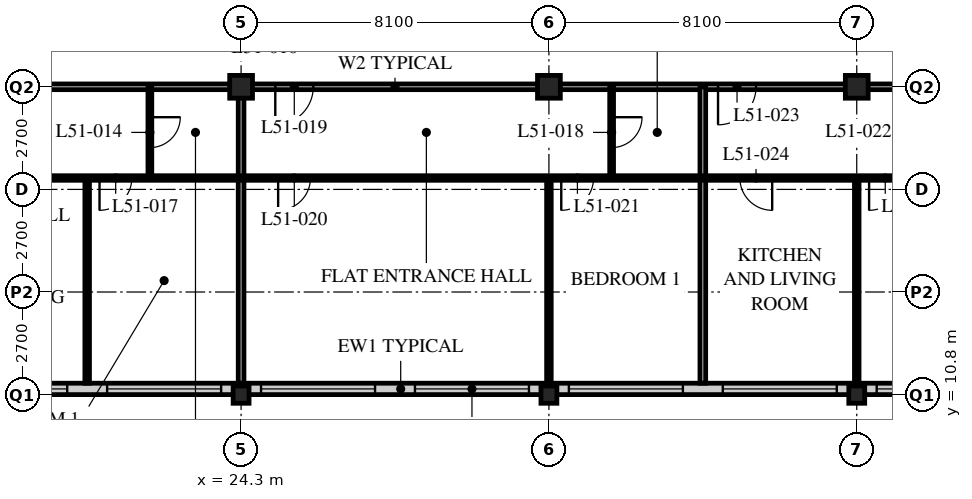
"""IFC4 building model, lengths in metres.
Left out: names, types, materials, properties, quantities, classifications, styles, units other than length and angle.
Written with IfcOpenShell. Run it as: python <this file> out.ifc"""

import sys

from ifc_helpers import new_model, si_unit, direction, frame, frame_2d, origin, origin_2d, place, context, subcontext, project, spatial, rectangle, hollow_rectangle, i_section, extrude, element, fill, save


model = new_model("IFC4")
c1 = context("Model", 3, precision=1e-05, world=origin(), true_north=direction((0.0, 1.0)))
c2 = subcontext(c1, "Body", "Model", "MODEL_VIEW")
j1 = project(units=[si_unit("LENGTHUNIT", "METRE"), si_unit("PLANEANGLEUNIT", "RADIAN")], contexts=[c1])
p1 = place(None, origin())
s1 = spatial("IfcSite", under=j1, at=p1, CompositionType="ELEMENT")
p2 = place(p1, origin())
s2 = spatial("IfcBuilding", under=s1, at=p2, CompositionType="ELEMENT")
p3 = place(p2, frame((0.0, 0.0, 199.2)))
s3 = spatial("IfcBuildingStorey", under=s2, at=p3, CompositionType="ELEMENT", Elevation=199.2)
p4 = place(p3, frame((24.3, 10.8, 0.0), z_axis=(0.0, 0.0, 1.0), x_axis=(1.0, 0.0, 0.0)))
e1 = element("IfcColumn", 1, at=p4, inside=s3, PredefinedType="COLUMN", context=c2, shape_type="SweptSolid", body=[
    extrude(i_section(OverallWidth=0.418, OverallDepth=0.456, WebThickness=0.042, FlangeThickness=0.067, FilletRadius=0.015, at=origin_2d()), origin(), (0.0, 0.0, 1.0), 3.6),
])
p5 = place(p3, frame((24.3, 18.9, 0.0), z_axis=(0.0, 0.0, 1.0), x_axis=(1.0, 0.0, 0.0)))
e2 = element("IfcColumn", 2, at=p5, inside=s3, PredefinedType="COLUMN", context=c2, shape_type="SweptSolid", body=[
    extrude(hollow_rectangle(XDim=0.6, YDim=0.6, WallThickness=0.05, at=origin_2d()), origin(), (0.0, 0.0, 1.0), 3.6),
])
p6 = place(p3, frame((32.4, 10.8, 0.0), z_axis=(0.0, 0.0, 1.0), x_axis=(1.0, 0.0, 0.0)))
e3 = element("IfcColumn", 3, at=p6, inside=s3, PredefinedType="COLUMN", context=c2, shape_type="SweptSolid", body=[
    extrude(i_section(OverallWidth=0.418, OverallDepth=0.456, WebThickness=0.042, FlangeThickness=0.067, FilletRadius=0.015, at=origin_2d()), origin(), (0.0, 0.0, 1.0), 3.6),
])
p7 = place(p3, frame((32.4, 18.9, 0.0), z_axis=(0.0, 0.0, 1.0), x_axis=(1.0, 0.0, 0.0)))
e4 = element("IfcColumn", 4, at=p7, inside=s3, PredefinedType="COLUMN", context=c2, shape_type="SweptSolid", body=[
    extrude(hollow_rectangle(XDim=0.6, YDim=0.6, WallThickness=0.05, at=origin_2d()), origin(), (0.0, 0.0, 1.0), 3.6),
])
p8 = place(p3, frame((40.5, 10.8, 0.0), z_axis=(0.0, 0.0, 1.0), x_axis=(1.0, 0.0, 0.0)))
e5 = element("IfcColumn", 5, at=p8, inside=s3, PredefinedType="COLUMN", context=c2, shape_type="SweptSolid", body=[
    extrude(i_section(OverallWidth=0.418, OverallDepth=0.456, WebThickness=0.042, FlangeThickness=0.067, FilletRadius=0.015, at=origin_2d()), origin(), (0.0, 0.0, 1.0), 3.6),
])
p9 = place(p3, frame((40.5, 18.9, 0.0), z_axis=(0.0, 0.0, 1.0), x_axis=(1.0, 0.0, 0.0)))
e6 = element("IfcColumn", 6, at=p9, inside=s3, PredefinedType="COLUMN", context=c2, shape_type="SweptSolid", body=[
    extrude(hollow_rectangle(XDim=0.6, YDim=0.6, WallThickness=0.05, at=origin_2d()), origin(), (0.0, 0.0, 1.0), 3.6),
])
p10 = place(p3, frame((8.4, 10.95, 0.0), z_axis=(0.0, 0.0, 1.0), x_axis=(1.0, 0.0, 0.0)))
e7 = element("IfcWall", 7, at=p10, inside=s3, PredefinedType="SOLIDWALL", context=c2, shape_type="SweptSolid", body=[
    extrude(rectangle(XDim=40.2, YDim=0.3, at=frame_2d((20.1, 0.0))), origin(), (0.0, 0.0, 1.0), 3.39),
])
p11 = place(p10, frame((0.225, 0.0, 0.6)))
e8 = element("IfcOpeningElement", 8, at=p11, cuts=e7, PredefinedType="OPENING", context=c2, shape_type="SweptSolid", body=[
    extrude(rectangle(XDim=3.0, YDim=2.4, at=frame_2d((1.5, 1.2))), frame((0.0, 0.16, 0.0), z_axis=(0.0, -1.0, 0.0), x_axis=(1.0, 0.0, 0.0)), (0.0, 0.0, 1.0), 0.32),
])
p12 = place(p10, frame((4.275, 0.0, 0.6)))
e9 = element("IfcOpeningElement", 9, at=p12, cuts=e7, PredefinedType="OPENING", context=c2, shape_type="SweptSolid", body=[
    extrude(rectangle(XDim=3.0, YDim=2.4, at=frame_2d((1.5, 1.2))), frame((0.0, 0.16, 0.0), z_axis=(0.0, -1.0, 0.0), x_axis=(1.0, 0.0, 0.0)), (0.0, 0.0, 1.0), 0.32),
])
p13 = place(p10, frame((8.325, 0.0, 0.6)))
e10 = element("IfcOpeningElement", 10, at=p13, cuts=e7, PredefinedType="OPENING", context=c2, shape_type="SweptSolid", body=[
    extrude(rectangle(XDim=3.0, YDim=2.4, at=frame_2d((1.5, 1.2))), frame((0.0, 0.16, 0.0), z_axis=(0.0, -1.0, 0.0), x_axis=(1.0, 0.0, 0.0)), (0.0, 0.0, 1.0), 0.32),
])
p14 = place(p10, frame((12.375, 0.0, 0.6)))
e11 = element("IfcOpeningElement", 11, at=p14, cuts=e7, PredefinedType="OPENING", context=c2, shape_type="SweptSolid", body=[
    extrude(rectangle(XDim=3.0, YDim=2.4, at=frame_2d((1.5, 1.2))), frame((0.0, 0.16, 0.0), z_axis=(0.0, -1.0, 0.0), x_axis=(1.0, 0.0, 0.0)), (0.0, 0.0, 1.0), 0.32),
])
p15 = place(p10, frame((16.425, 0.0, 0.6)))
e12 = element("IfcOpeningElement", 12, at=p15, cuts=e7, PredefinedType="OPENING", context=c2, shape_type="SweptSolid", body=[
    extrude(rectangle(XDim=3.0, YDim=2.4, at=frame_2d((1.5, 1.2))), frame((0.0, 0.16, 0.0), z_axis=(0.0, -1.0, 0.0), x_axis=(1.0, 0.0, 0.0)), (0.0, 0.0, 1.0), 0.32),
])
p16 = place(p10, frame((20.475, 0.0, 0.6)))
e13 = element("IfcOpeningElement", 13, at=p16, cuts=e7, PredefinedType="OPENING", context=c2, shape_type="SweptSolid", body=[
    extrude(rectangle(XDim=3.0, YDim=2.4, at=frame_2d((1.5, 1.2))), frame((0.0, 0.16, 0.0), z_axis=(0.0, -1.0, 0.0), x_axis=(1.0, 0.0, 0.0)), (0.0, 0.0, 1.0), 0.32),
])
p17 = place(p10, frame((24.525, 0.0, 0.6)))
e14 = element("IfcOpeningElement", 14, at=p17, cuts=e7, PredefinedType="OPENING", context=c2, shape_type="SweptSolid", body=[
    extrude(rectangle(XDim=3.0, YDim=2.4, at=frame_2d((1.5, 1.2))), frame((0.0, 0.16, 0.0), z_axis=(0.0, -1.0, 0.0), x_axis=(1.0, 0.0, 0.0)), (0.0, 0.0, 1.0), 0.32),
])
p18 = place(p10, frame((28.575, 0.0, 0.6)))
e15 = element("IfcOpeningElement", 15, at=p18, cuts=e7, PredefinedType="OPENING", context=c2, shape_type="SweptSolid", body=[
    extrude(rectangle(XDim=3.0, YDim=2.4, at=frame_2d((1.5, 1.2))), frame((0.0, 0.16, 0.0), z_axis=(0.0, -1.0, 0.0), x_axis=(1.0, 0.0, 0.0)), (0.0, 0.0, 1.0), 0.32),
])
p19 = place(p10, frame((32.625, 0.0, 0.6)))
e16 = element("IfcOpeningElement", 16, at=p19, cuts=e7, PredefinedType="OPENING", context=c2, shape_type="SweptSolid", body=[
    extrude(rectangle(XDim=3.0, YDim=2.4, at=frame_2d((1.5, 1.2))), frame((0.0, 0.16, 0.0), z_axis=(0.0, -1.0, 0.0), x_axis=(1.0, 0.0, 0.0)), (0.0, 0.0, 1.0), 0.32),
])
p20 = place(p10, frame((36.675, 0.0, 0.6)))
e17 = element("IfcOpeningElement", 17, at=p20, cuts=e7, PredefinedType="OPENING", context=c2, shape_type="SweptSolid", body=[
    extrude(rectangle(XDim=3.0, YDim=2.4, at=frame_2d((1.5, 1.2))), frame((0.0, 0.16, 0.0), z_axis=(0.0, -1.0, 0.0), x_axis=(1.0, 0.0, 0.0)), (0.0, 0.0, 1.0), 0.32),
])
p21 = place(p3, frame((8.1, 18.9, 0.0), z_axis=(0.0, 0.0, 1.0), x_axis=(1.0, 0.0, 0.0)))
e18 = element("IfcWall", 18, at=p21, inside=s3, PredefinedType="PARTITIONING", context=c2, shape_type="SweptSolid", body=[
    extrude(rectangle(XDim=40.5, YDim=0.15, at=frame_2d((20.25, 0.0))), origin(), (0.0, 0.0, 1.0), 2.778),
])
p22 = place(p21, frame((4.45, 0.0, 0.0)))
e19 = element("IfcOpeningElement", 19, at=p22, cuts=e18, PredefinedType="OPENING", context=c2, shape_type="SweptSolid", body=[
    extrude(rectangle(XDim=1.0, YDim=2.1, at=frame_2d((0.5, 1.05))), frame((0.0, 0.085, 0.0), z_axis=(0.0, -1.0, 0.0), x_axis=(1.0, 0.0, 0.0)), (0.0, 0.0, 1.0), 0.17),
])
p23 = place(p21, frame((17.1, 0.0, 0.0)))
e20 = element("IfcOpeningElement", 20, at=p23, cuts=e18, PredefinedType="OPENING", context=c2, shape_type="SweptSolid", body=[
    extrude(rectangle(XDim=1.0, YDim=2.1, at=frame_2d((0.5, 1.05))), frame((0.0, 0.085, 0.0), z_axis=(0.0, -1.0, 0.0), x_axis=(1.0, 0.0, 0.0)), (0.0, 0.0, 1.0), 0.17),
])
p24 = place(p21, frame((28.75, 0.0, 0.0)))
e21 = element("IfcOpeningElement", 21, at=p24, cuts=e18, PredefinedType="OPENING", context=c2, shape_type="SweptSolid", body=[
    extrude(rectangle(XDim=1.0, YDim=2.1, at=frame_2d((0.5, 1.05))), frame((0.0, 0.085, 0.0), z_axis=(0.0, -1.0, 0.0), x_axis=(1.0, 0.0, 0.0)), (0.0, 0.0, 1.0), 0.17),
])
p25 = place(p21, frame((2.625, 0.0, 0.0)))
e22 = element("IfcOpeningElement", 22, at=p25, cuts=e18, PredefinedType="OPENING", context=c2, shape_type="SweptSolid", body=[
    extrude(rectangle(XDim=1.0, YDim=2.1, at=frame_2d((0.5, 1.05))), frame((0.0, 0.085, 0.0), z_axis=(0.0, -1.0, 0.0), x_axis=(1.0, 0.0, 0.0)), (0.0, 0.0, 1.0), 0.17),
])
p26 = place(p21, frame((36.875, 0.0, 0.0)))
e23 = element("IfcOpeningElement", 23, at=p26, cuts=e18, PredefinedType="OPENING", context=c2, shape_type="SweptSolid", body=[
    extrude(rectangle(XDim=1.0, YDim=2.1, at=frame_2d((0.5, 1.05))), frame((0.0, 0.085, 0.0), z_axis=(0.0, -1.0, 0.0), x_axis=(1.0, 0.0, 0.0)), (0.0, 0.0, 1.0), 0.17),
])
p27 = place(p3, frame((21.9, 18.9, 0.0), z_axis=(0.0, 0.0, 1.0), x_axis=(0.0, -1.0, 0.0)))
e24 = element("IfcWall", 24, at=p27, inside=s3, PredefinedType="PARTITIONING", context=c2, shape_type="SweptSolid", body=[
    extrude(rectangle(XDim=2.4, YDim=0.1, at=frame_2d((1.2, 0.0))), origin(), (0.0, 0.0, 1.0), 3.39),
])
p28 = place(p27, frame((0.8, 0.0, 0.0)))
e25 = element("IfcOpeningElement", 25, at=p28, cuts=e24, PredefinedType="OPENING", context=c2, shape_type="SweptSolid", body=[
    extrude(rectangle(XDim=0.8, YDim=2.1, at=frame_2d((0.4, 1.05))), frame((0.0, 0.06, 0.0), z_axis=(0.0, -1.0, 0.0), x_axis=(1.0, 0.0, 0.0)), (0.0, 0.0, 1.0), 0.12),
])
p29 = place(p3, frame((20.25, 16.5, 0.0), z_axis=(0.0, 0.0, 1.0), x_axis=(0.0, -1.0, 0.0)))
e26 = element("IfcWall", 26, at=p29, inside=s3, PredefinedType="PARTITIONING", context=c2, shape_type="SweptSolid", body=[
    extrude(rectangle(XDim=5.4, YDim=0.12, at=frame_2d((2.7, 0.0))), origin(), (0.0, 0.0, 1.0), 3.39),
])
p30 = place(p3, frame((24.3, 18.9, 0.0), z_axis=(0.0, 0.0, 1.0), x_axis=(0.0, -1.0, 0.0)))
e27 = element("IfcWall", 27, at=p30, inside=s3, PredefinedType="PARTITIONING", context=c2, shape_type="SweptSolid", body=[
    extrude(rectangle(XDim=7.8, YDim=0.15, at=frame_2d((3.9, 0.0))), origin(), (0.0, 0.0, 1.0), 2.778),
])
p31 = place(p3, frame((34.05, 18.9, 0.0), z_axis=(0.0, 0.0, 1.0), x_axis=(0.0, -1.0, 0.0)))
e28 = element("IfcWall", 28, at=p31, inside=s3, PredefinedType="PARTITIONING", context=c2, shape_type="SweptSolid", body=[
    extrude(rectangle(XDim=2.4, YDim=0.1, at=frame_2d((1.2, 0.0))), origin(), (0.0, 0.0, 1.0), 3.39),
])
p32 = place(p31, frame((0.8, 0.0, 0.0)))
e29 = element("IfcOpeningElement", 29, at=p32, cuts=e28, PredefinedType="OPENING", context=c2, shape_type="SweptSolid", body=[
    extrude(rectangle(XDim=0.8, YDim=2.1, at=frame_2d((0.4, 1.05))), frame((0.0, 0.06, 0.0), z_axis=(0.0, -1.0, 0.0), x_axis=(1.0, 0.0, 0.0)), (0.0, 0.0, 1.0), 0.12),
])
p33 = place(p3, frame((32.4, 16.5, 0.0), z_axis=(0.0, 0.0, 1.0), x_axis=(0.0, -1.0, 0.0)))
e30 = element("IfcWall", 30, at=p33, inside=s3, PredefinedType="PARTITIONING", context=c2, shape_type="SweptSolid", body=[
    extrude(rectangle(XDim=5.4, YDim=0.12, at=frame_2d((2.7, 0.0))), origin(), (0.0, 0.0, 1.0), 2.778),
])
p34 = place(p3, frame((36.45, 18.9, 0.0), z_axis=(0.0, 0.0, 1.0), x_axis=(0.0, -1.0, 0.0)))
e31 = element("IfcWall", 31, at=p34, inside=s3, PredefinedType="PARTITIONING", context=c2, shape_type="SweptSolid", body=[
    extrude(rectangle(XDim=7.8, YDim=0.15, at=frame_2d((3.9, 0.0))), origin(), (0.0, 0.0, 1.0), 3.39),
])
p35 = place(p3, frame((40.5, 16.5, 0.0), z_axis=(0.0, 0.0, 1.0), x_axis=(0.0, -1.0, 0.0)))
e32 = element("IfcWall", 32, at=p35, inside=s3, PredefinedType="PARTITIONING", context=c2, shape_type="SweptSolid", body=[
    extrude(rectangle(XDim=5.4, YDim=0.12, at=frame_2d((2.7, 0.0))), origin(), (0.0, 0.0, 1.0), 2.778),
])
p36 = place(p3, frame((8.1, 16.5, 0.0), z_axis=(0.0, 0.0, 1.0), x_axis=(1.0, 0.0, 0.0)))
e33 = element("IfcWall", 33, at=p36, inside=s3, PredefinedType="PARTITIONING", context=c2, shape_type="SweptSolid", body=[
    extrude(rectangle(XDim=40.5, YDim=0.12, at=frame_2d((20.25, 0.0))), origin(), (0.0, 0.0, 1.0), 3.39),
])
p37 = place(p36, frame((5.025, 0.0, 0.0)))
e34 = element("IfcOpeningElement", 34, at=p37, cuts=e33, PredefinedType="OPENING", context=c2, shape_type="SweptSolid", body=[
    extrude(rectangle(XDim=0.85, YDim=2.1, at=frame_2d((0.425, 1.05))), frame((0.0, 0.07, 0.0), z_axis=(0.0, -1.0, 0.0), x_axis=(1.0, 0.0, 0.0)), (0.0, 0.0, 1.0), 0.14),
])
p38 = place(p36, frame((12.475, 0.0, 0.0)))
e35 = element("IfcOpeningElement", 35, at=p38, cuts=e33, PredefinedType="OPENING", context=c2, shape_type="SweptSolid", body=[
    extrude(rectangle(XDim=0.85, YDim=2.1, at=frame_2d((0.425, 1.05))), frame((0.0, 0.07, 0.0), z_axis=(0.0, -1.0, 0.0), x_axis=(1.0, 0.0, 0.0)), (0.0, 0.0, 1.0), 0.14),
])
p39 = place(p36, frame((17.175, 0.0, 0.0)))
e36 = element("IfcOpeningElement", 36, at=p39, cuts=e33, PredefinedType="OPENING", context=c2, shape_type="SweptSolid", body=[
    extrude(rectangle(XDim=0.85, YDim=2.1, at=frame_2d((0.425, 1.05))), frame((0.0, 0.07, 0.0), z_axis=(0.0, -1.0, 0.0), x_axis=(1.0, 0.0, 0.0)), (0.0, 0.0, 1.0), 0.14),
])
p40 = place(p36, frame((24.625, 0.0, 0.0)))
e37 = element("IfcOpeningElement", 37, at=p40, cuts=e33, PredefinedType="OPENING", context=c2, shape_type="SweptSolid", body=[
    extrude(rectangle(XDim=0.85, YDim=2.1, at=frame_2d((0.425, 1.05))), frame((0.0, 0.07, 0.0), z_axis=(0.0, -1.0, 0.0), x_axis=(1.0, 0.0, 0.0)), (0.0, 0.0, 1.0), 0.14),
])
p41 = place(p36, frame((29.325, 0.0, 0.0)))
e38 = element("IfcOpeningElement", 38, at=p41, cuts=e33, PredefinedType="OPENING", context=c2, shape_type="SweptSolid", body=[
    extrude(rectangle(XDim=0.85, YDim=2.1, at=frame_2d((0.425, 1.05))), frame((0.0, 0.07, 0.0), z_axis=(0.0, -1.0, 0.0), x_axis=(1.0, 0.0, 0.0)), (0.0, 0.0, 1.0), 0.14),
])
p42 = place(p36, frame((32.725, 0.0, 0.0)))
e39 = element("IfcOpeningElement", 39, at=p42, cuts=e33, PredefinedType="OPENING", context=c2, shape_type="SweptSolid", body=[
    extrude(rectangle(XDim=0.85, YDim=2.1, at=frame_2d((0.425, 1.05))), frame((0.0, 0.07, 0.0), z_axis=(0.0, -1.0, 0.0), x_axis=(1.0, 0.0, 0.0)), (0.0, 0.0, 1.0), 0.14),
])
p43 = place(p36, frame((2.725, 0.0, 0.0)))
e40 = element("IfcOpeningElement", 40, at=p43, cuts=e33, PredefinedType="OPENING", context=c2, shape_type="SweptSolid", body=[
    extrude(rectangle(XDim=0.85, YDim=2.1, at=frame_2d((0.425, 1.05))), frame((0.0, 0.07, 0.0), z_axis=(0.0, -1.0, 0.0), x_axis=(1.0, 0.0, 0.0)), (0.0, 0.0, 1.0), 0.14),
])
p44 = place(p36, frame((36.925, 0.0, 0.0)))
e41 = element("IfcOpeningElement", 41, at=p44, cuts=e33, PredefinedType="OPENING", context=c2, shape_type="SweptSolid", body=[
    extrude(rectangle(XDim=0.85, YDim=2.1, at=frame_2d((0.425, 1.05))), frame((0.0, 0.07, 0.0), z_axis=(0.0, -1.0, 0.0), x_axis=(1.0, 0.0, 0.0)), (0.0, 0.0, 1.0), 0.14),
])
p45 = place(p13, origin())
e42 = element("IfcWindow", 42, at=p45, inside=s3, PartitioningType="SINGLE_PANEL", PredefinedType="WINDOW", context=c2, shape_type="SweptSolid", body=[
    extrude(rectangle(XDim=3.0, YDim=2.4, at=frame_2d((1.5, 1.2))), frame((0.0, 0.03, 0.0), z_axis=(0.0, -1.0, 0.0), x_axis=(1.0, 0.0, 0.0)), (0.0, 0.0, 1.0), 0.06),
])
fill(e10, e42)
p46 = place(p14, origin())
e43 = element("IfcWindow", 43, at=p46, inside=s3, PartitioningType="SINGLE_PANEL", PredefinedType="WINDOW", context=c2, shape_type="SweptSolid", body=[
    extrude(rectangle(XDim=3.0, YDim=2.4, at=frame_2d((1.5, 1.2))), frame((0.0, 0.03, 0.0), z_axis=(0.0, -1.0, 0.0), x_axis=(1.0, 0.0, 0.0)), (0.0, 0.0, 1.0), 0.06),
])
fill(e11, e43)
p47 = place(p15, origin())
e44 = element("IfcWindow", 44, at=p47, inside=s3, PartitioningType="SINGLE_PANEL", PredefinedType="WINDOW", context=c2, shape_type="SweptSolid", body=[
    extrude(rectangle(XDim=3.0, YDim=2.4, at=frame_2d((1.5, 1.2))), frame((0.0, 0.03, 0.0), z_axis=(0.0, -1.0, 0.0), x_axis=(1.0, 0.0, 0.0)), (0.0, 0.0, 1.0), 0.06),
])
fill(e12, e44)
p48 = place(p16, origin())
e45 = element("IfcWindow", 45, at=p48, inside=s3, PartitioningType="SINGLE_PANEL", PredefinedType="WINDOW", context=c2, shape_type="SweptSolid", body=[
    extrude(rectangle(XDim=3.0, YDim=2.4, at=frame_2d((1.5, 1.2))), frame((0.0, 0.03, 0.0), z_axis=(0.0, -1.0, 0.0), x_axis=(1.0, 0.0, 0.0)), (0.0, 0.0, 1.0), 0.06),
])
fill(e13, e45)
p49 = place(p17, origin())
e46 = element("IfcWindow", 46, at=p49, inside=s3, PartitioningType="SINGLE_PANEL", PredefinedType="WINDOW", context=c2, shape_type="SweptSolid", body=[
    extrude(rectangle(XDim=3.0, YDim=2.4, at=frame_2d((1.5, 1.2))), frame((0.0, 0.03, 0.0), z_axis=(0.0, -1.0, 0.0), x_axis=(1.0, 0.0, 0.0)), (0.0, 0.0, 1.0), 0.06),
])
fill(e14, e46)
p50 = place(p18, origin())
e47 = element("IfcWindow", 47, at=p50, inside=s3, PartitioningType="SINGLE_PANEL", PredefinedType="WINDOW", context=c2, shape_type="SweptSolid", body=[
    extrude(rectangle(XDim=3.0, YDim=2.4, at=frame_2d((1.5, 1.2))), frame((0.0, 0.03, 0.0), z_axis=(0.0, -1.0, 0.0), x_axis=(1.0, 0.0, 0.0)), (0.0, 0.0, 1.0), 0.06),
])
fill(e15, e47)
p51 = place(p19, origin())
e48 = element("IfcWindow", 48, at=p51, inside=s3, PartitioningType="SINGLE_PANEL", PredefinedType="WINDOW", context=c2, shape_type="SweptSolid", body=[
    extrude(rectangle(XDim=3.0, YDim=2.4, at=frame_2d((1.5, 1.2))), frame((0.0, 0.03, 0.0), z_axis=(0.0, -1.0, 0.0), x_axis=(1.0, 0.0, 0.0)), (0.0, 0.0, 1.0), 0.06),
])
fill(e16, e48)
p52 = place(p28, origin())
e49 = element("IfcDoor", 49, at=p52, inside=s3, OperationType="SINGLE_SWING_LEFT", PredefinedType="DOOR", context=c2, shape_type="SweptSolid", body=[
    extrude(rectangle(XDim=0.8, YDim=2.1, at=frame_2d((0.4, 1.05))), frame((0.0, 0.025, 0.0), z_axis=(0.0, -1.0, 0.0), x_axis=(1.0, 0.0, 0.0)), (0.0, 0.0, 1.0), 0.05),
])
fill(e25, e49)
p53 = place(p38, origin())
e50 = element("IfcDoor", 50, at=p53, inside=s3, OperationType="SINGLE_SWING_RIGHT", PredefinedType="DOOR", context=c2, shape_type="SweptSolid", body=[
    extrude(rectangle(XDim=0.85, YDim=2.1, at=frame_2d((0.425, 1.05))), frame((0.0, 0.025, 0.0), z_axis=(0.0, -1.0, 0.0), x_axis=(1.0, 0.0, 0.0)), (0.0, 0.0, 1.0), 0.05),
])
fill(e35, e50)
p54 = place(p32, origin())
e51 = element("IfcDoor", 51, at=p54, inside=s3, OperationType="SINGLE_SWING_LEFT", PredefinedType="DOOR", context=c2, shape_type="SweptSolid", body=[
    extrude(rectangle(XDim=0.8, YDim=2.1, at=frame_2d((0.4, 1.05))), frame((0.0, 0.025, 0.0), z_axis=(0.0, -1.0, 0.0), x_axis=(1.0, 0.0, 0.0)), (0.0, 0.0, 1.0), 0.05),
])
fill(e29, e51)
p55 = place(p23, origin())
e52 = element("IfcDoor", 52, at=p55, inside=s3, OperationType="SINGLE_SWING_RIGHT", PredefinedType="DOOR", context=c2, shape_type="SweptSolid", body=[
    extrude(rectangle(XDim=1.0, YDim=2.1, at=frame_2d((0.5, 1.05))), frame((0.0, 0.025, 0.0), z_axis=(0.0, -1.0, 0.0), x_axis=(1.0, 0.0, 0.0)), (0.0, 0.0, 1.0), 0.05),
])
fill(e20, e52)
p56 = place(p39, origin())
e53 = element("IfcDoor", 53, at=p56, inside=s3, OperationType="SINGLE_SWING_RIGHT", PredefinedType="DOOR", context=c2, shape_type="SweptSolid", body=[
    extrude(rectangle(XDim=0.85, YDim=2.1, at=frame_2d((0.425, 1.05))), frame((0.0, 0.025, 0.0), z_axis=(0.0, -1.0, 0.0), x_axis=(1.0, 0.0, 0.0)), (0.0, 0.0, 1.0), 0.05),
])
fill(e36, e53)
p57 = place(p40, origin())
e54 = element("IfcDoor", 54, at=p57, inside=s3, OperationType="SINGLE_SWING_RIGHT", PredefinedType="DOOR", context=c2, shape_type="SweptSolid", body=[
    extrude(rectangle(XDim=0.85, YDim=2.1, at=frame_2d((0.425, 1.05))), frame((0.0, 0.025, 0.0), z_axis=(0.0, -1.0, 0.0), x_axis=(1.0, 0.0, 0.0)), (0.0, 0.0, 1.0), 0.05),
])
fill(e37, e54)
p58 = place(p24, origin())
e55 = element("IfcDoor", 55, at=p58, inside=s3, OperationType="SINGLE_SWING_RIGHT", PredefinedType="DOOR", context=c2, shape_type="SweptSolid", body=[
    extrude(rectangle(XDim=1.0, YDim=2.1, at=frame_2d((0.5, 1.05))), frame((0.0, 0.025, 0.0), z_axis=(0.0, -1.0, 0.0), x_axis=(1.0, 0.0, 0.0)), (0.0, 0.0, 1.0), 0.05),
])
fill(e21, e55)
p59 = place(p41, origin())
e56 = element("IfcDoor", 56, at=p59, inside=s3, OperationType="SINGLE_SWING_LEFT", PredefinedType="DOOR", context=c2, shape_type="SweptSolid", body=[
    extrude(rectangle(XDim=0.85, YDim=2.1, at=frame_2d((0.425, 1.05))), frame((0.0, 0.025, 0.0), z_axis=(0.0, -1.0, 0.0), x_axis=(1.0, 0.0, 0.0)), (0.0, 0.0, 1.0), 0.05),
])
fill(e38, e56)
p60 = place(p42, origin())
e57 = element("IfcDoor", 57, at=p60, inside=s3, OperationType="SINGLE_SWING_RIGHT", PredefinedType="DOOR", context=c2, shape_type="SweptSolid", body=[
    extrude(rectangle(XDim=0.85, YDim=2.1, at=frame_2d((0.425, 1.05))), frame((0.0, 0.025, 0.0), z_axis=(0.0, -1.0, 0.0), x_axis=(1.0, 0.0, 0.0)), (0.0, 0.0, 1.0), 0.05),
])
fill(e39, e57)
save(model, sys.argv[1])
